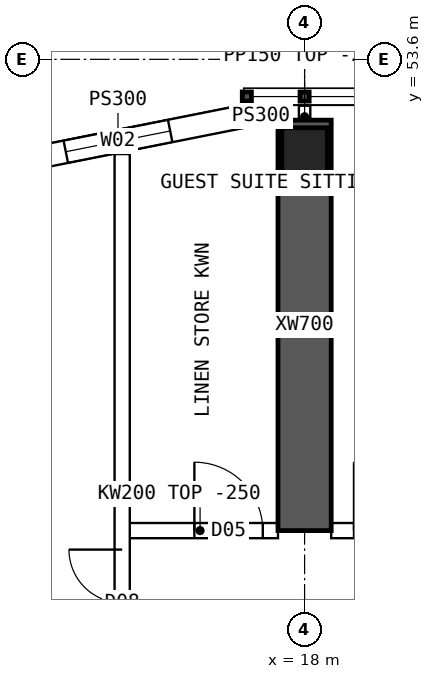
"""IFC4 building model, lengths in metres.
Left out: names, types, materials, properties, quantities, classifications, styles, units other than length and angle.
Written with IfcOpenShell. Run it as: python <this file> out.ifc"""

import sys

from ifc_helpers import new_model, si_unit, direction, frame, frame_2d, origin, origin_2d, place, context, subcontext, project, spatial, polyline, rectangle, hollow_rectangle, outline, extrude, element, fill, save


model = new_model("IFC4")
c1 = context("Model", 3, precision=1e-05, world=origin(), true_north=direction((0.0, 1.0)))
c2 = subcontext(c1, "Body", "Model", "MODEL_VIEW")
j1 = project(units=[si_unit("LENGTHUNIT", "METRE"), si_unit("PLANEANGLEUNIT", "RADIAN")], contexts=[c1])
p1 = place(None, origin())
s1 = spatial("IfcSite", under=j1, at=p1, CompositionType="ELEMENT")
p2 = place(p1, origin())
s2 = spatial("IfcBuilding", under=s1, at=p2, CompositionType="ELEMENT")
p3 = place(p2, frame((0.0, 0.0, 239.05)))
s3 = spatial("IfcBuildingStorey", under=s2, at=p3, CompositionType="ELEMENT", Elevation=239.05)
p4 = place(p3, frame((18.0, 52.4, 0.0), z_axis=(0.0, 0.0, 1.0), x_axis=(1.0, 0.0, 0.0)))
e1 = element("IfcColumn", 1, at=p4, inside=s3, PredefinedType="COLUMN", context=c2, shape_type="SweptSolid", body=[
    extrude(hollow_rectangle(XDim=0.6, YDim=0.6, WallThickness=0.06, at=origin_2d()), origin(), (0.0, 0.0, 1.0), 3.75),
])
p5 = place(p3, frame((18.0, 47.4, 0.0), z_axis=(0.0, 0.0, 1.0), x_axis=(0.0, 1.0, 0.0)))
e2 = element("IfcWall", 2, at=p5, inside=s3, PredefinedType="SHEAR", context=c2, shape_type="SweptSolid", body=[
    extrude(rectangle(XDim=5.4, YDim=0.7, at=frame_2d((2.7, 0.0))), origin(), (0.0, 0.0, 1.0), 3.75),
])
p6 = place(p3, frame((17.2, 52.85, 0.0), z_axis=(0.0, 0.0, 1.0), x_axis=(-0.98078325777, -0.195100490205, 0.0)))
e3 = element("IfcWall", 3, at=p6, inside=s3, PredefinedType="SOLIDWALL", context=c2, shape_type="SweptSolid", body=[
    extrude(outline(polyline([(-0.03, -0.15), (3.405, -0.15), (3.345, 0.15), (0.03, 0.15), (-0.03, -0.15)])), origin(), (0.0, 0.0, 1.0), 3.5),
])
p7 = place(p6, frame((0.988, 0.0, 0.9)))
e4 = element("IfcOpeningElement", 4, at=p7, cuts=e3, PredefinedType="OPENING", context=c2, shape_type="SweptSolid", body=[
    extrude(rectangle(XDim=1.4, YDim=1.8, at=frame_2d((0.7, 0.9))), frame((0.0, 0.16, 0.0), z_axis=(0.0, -1.0, 0.0), x_axis=(1.0, 0.0, 0.0)), (0.0, 0.0, 1.0), 0.32),
])
p8 = place(p3, frame((17.2, 52.85, 0.0), z_axis=(0.0, 0.0, 1.0), x_axis=(1.0, 0.0, 0.0)))
e5 = element("IfcWall", 5, at=p8, inside=s3, PredefinedType="SOLIDWALL", context=c2, shape_type="SweptSolid", body=[
    extrude(rectangle(XDim=0.45, YDim=0.3, at=frame_2d((0.225, 0.0))), origin(), (0.0, 0.0, 1.0), 3.5),
])
p9 = place(p3, frame((15.6, 47.4, 0.0), z_axis=(0.0, 0.0, 1.0), x_axis=(1.0, 0.0, 0.0)))
e6 = element("IfcWall", 6, at=p9, inside=s3, PredefinedType="SOLIDWALL", context=c2, shape_type="SweptSolid", body=[
    extrude(rectangle(XDim=2.05, YDim=0.2, at=frame_2d((1.025, 0.0))), origin(), (0.0, 0.0, 1.0), 3.5),
])
p10 = place(p9, frame((0.95, 0.0, 0.0)))
e7 = element("IfcOpeningElement", 7, at=p10, cuts=e6, PredefinedType="OPENING", context=c2, shape_type="SweptSolid", body=[
    extrude(rectangle(XDim=0.9, YDim=2.1, at=frame_2d((0.45, 1.05))), frame((0.0, 0.11, 0.0), z_axis=(0.0, -1.0, 0.0), x_axis=(1.0, 0.0, 0.0)), (0.0, 0.0, 1.0), 0.22),
])
p11 = place(p3, frame((18.35, 47.4, 0.0), z_axis=(0.0, 0.0, 1.0), x_axis=(1.0, 0.0, 0.0)))
e8 = element("IfcWall", 8, at=p11, inside=s3, PredefinedType="SOLIDWALL", context=c2, shape_type="SweptSolid", body=[
    extrude(outline(polyline([(0.0, 0.0), (5.3, 0.0), (5.3, 3.1), (0.0, 3.1), (0.0, 0.0)])), frame((0.0, 0.1, 0.0), z_axis=(0.0, -1.0, 0.0), x_axis=(1.0, 0.0, 0.0)), (0.0, 0.0, 1.0), 0.2),
])
p12 = place(p11, frame((0.3, 0.0, 0.0)))
e9 = element("IfcOpeningElement", 9, at=p12, cuts=e8, PredefinedType="OPENING", context=c2, shape_type="SweptSolid", body=[
    extrude(rectangle(XDim=0.9, YDim=2.1, at=frame_2d((0.45, 1.05))), frame((0.0, 0.11, 0.0), z_axis=(0.0, -1.0, 0.0), x_axis=(1.0, 0.0, 0.0)), (0.0, 0.0, 1.0), 0.22),
])
p13 = place(p3, frame((15.6, 11.646, 0.0), z_axis=(0.0, 0.0, 1.0), x_axis=(0.0, 1.0, 0.0)))
e10 = element("IfcWall", 10, at=p13, inside=s3, PredefinedType="SOLIDWALL", context=c2, shape_type="SweptSolid", body=[
    extrude(rectangle(XDim=40.708, YDim=0.2, at=frame_2d((20.354, 0.0))), origin(), (0.0, 0.0, 1.0), 3.5),
])
p14 = place(p13, frame((21.194, 0.0, 0.0)))
e11 = element("IfcOpeningElement", 11, at=p14, cuts=e10, PredefinedType="OPENING", context=c2, shape_type="SweptSolid", body=[
    extrude(rectangle(XDim=1.2, YDim=2.1, at=frame_2d((0.6, 1.05))), frame((0.0, 0.11, 0.0), z_axis=(0.0, -1.0, 0.0), x_axis=(1.0, 0.0, 0.0)), (0.0, 0.0, 1.0), 0.22),
])
p15 = place(p13, frame((5.104, 0.0, 0.0)))
e12 = element("IfcOpeningElement", 12, at=p15, cuts=e10, PredefinedType="OPENING", context=c2, shape_type="SweptSolid", body=[
    extrude(rectangle(XDim=1.4, YDim=2.1, at=frame_2d((0.7, 1.05))), frame((0.0, 0.11, 0.0), z_axis=(0.0, -1.0, 0.0), x_axis=(1.0, 0.0, 0.0)), (0.0, 0.0, 1.0), 0.22),
])
p16 = place(p13, frame((34.104, 0.0, 0.0)))
e13 = element("IfcOpeningElement", 13, at=p16, cuts=e10, PredefinedType="OPENING", context=c2, shape_type="SweptSolid", body=[
    extrude(rectangle(XDim=1.4, YDim=2.1, at=frame_2d((0.7, 1.05))), frame((0.0, 0.11, 0.0), z_axis=(0.0, -1.0, 0.0), x_axis=(1.0, 0.0, 0.0)), (0.0, 0.0, 1.0), 0.22),
])
p17 = place(p3, frame((18.0, 52.7, 0.0), z_axis=(0.0, 0.0, 1.0), x_axis=(0.0, 1.0, 0.0)))
e14 = element("IfcWall", 14, at=p17, inside=s3, PredefinedType="PARTITIONING", context=c2, shape_type="SweptSolid", body=[
    extrude(rectangle(XDim=0.29, YDim=0.15, at=frame_2d((0.145, 0.0))), origin(), (0.0, 0.0, 1.0), 3.5),
])
p18 = place(p7, origin())
e15 = element("IfcWindow", 15, at=p18, inside=s3, PartitioningType="SINGLE_PANEL", PredefinedType="WINDOW", context=c2, shape_type="SweptSolid", body=[
    extrude(rectangle(XDim=1.4, YDim=1.8, at=frame_2d((0.7, 0.9))), frame((0.0, 0.03, 0.0), z_axis=(0.0, -1.0, 0.0), x_axis=(1.0, 0.0, 0.0)), (0.0, 0.0, 1.0), 0.06),
])
fill(e4, e15)
p19 = place(p16, origin())
e16 = element("IfcDoor", 16, at=p19, inside=s3, OperationType="DOUBLE_DOOR_SINGLE_SWING", PredefinedType="DOOR", context=c2, shape_type="SweptSolid", body=[
    extrude(rectangle(XDim=1.4, YDim=2.1, at=frame_2d((0.7, 1.05))), frame((0.0, 0.025, 0.0), z_axis=(0.0, -1.0, 0.0), x_axis=(1.0, 0.0, 0.0)), (0.0, 0.0, 1.0), 0.05),
])
fill(e13, e16)
p20 = place(p10, origin())
e17 = element("IfcDoor", 17, at=p20, inside=s3, OperationType="SINGLE_SWING_LEFT", PredefinedType="DOOR", context=c2, shape_type="SweptSolid", body=[
    extrude(rectangle(XDim=0.9, YDim=2.1, at=frame_2d((0.45, 1.05))), frame((0.0, 0.025, 0.0), z_axis=(0.0, -1.0, 0.0), x_axis=(1.0, 0.0, 0.0)), (0.0, 0.0, 1.0), 0.05),
])
fill(e7, e17)
save(model, sys.argv[1])
